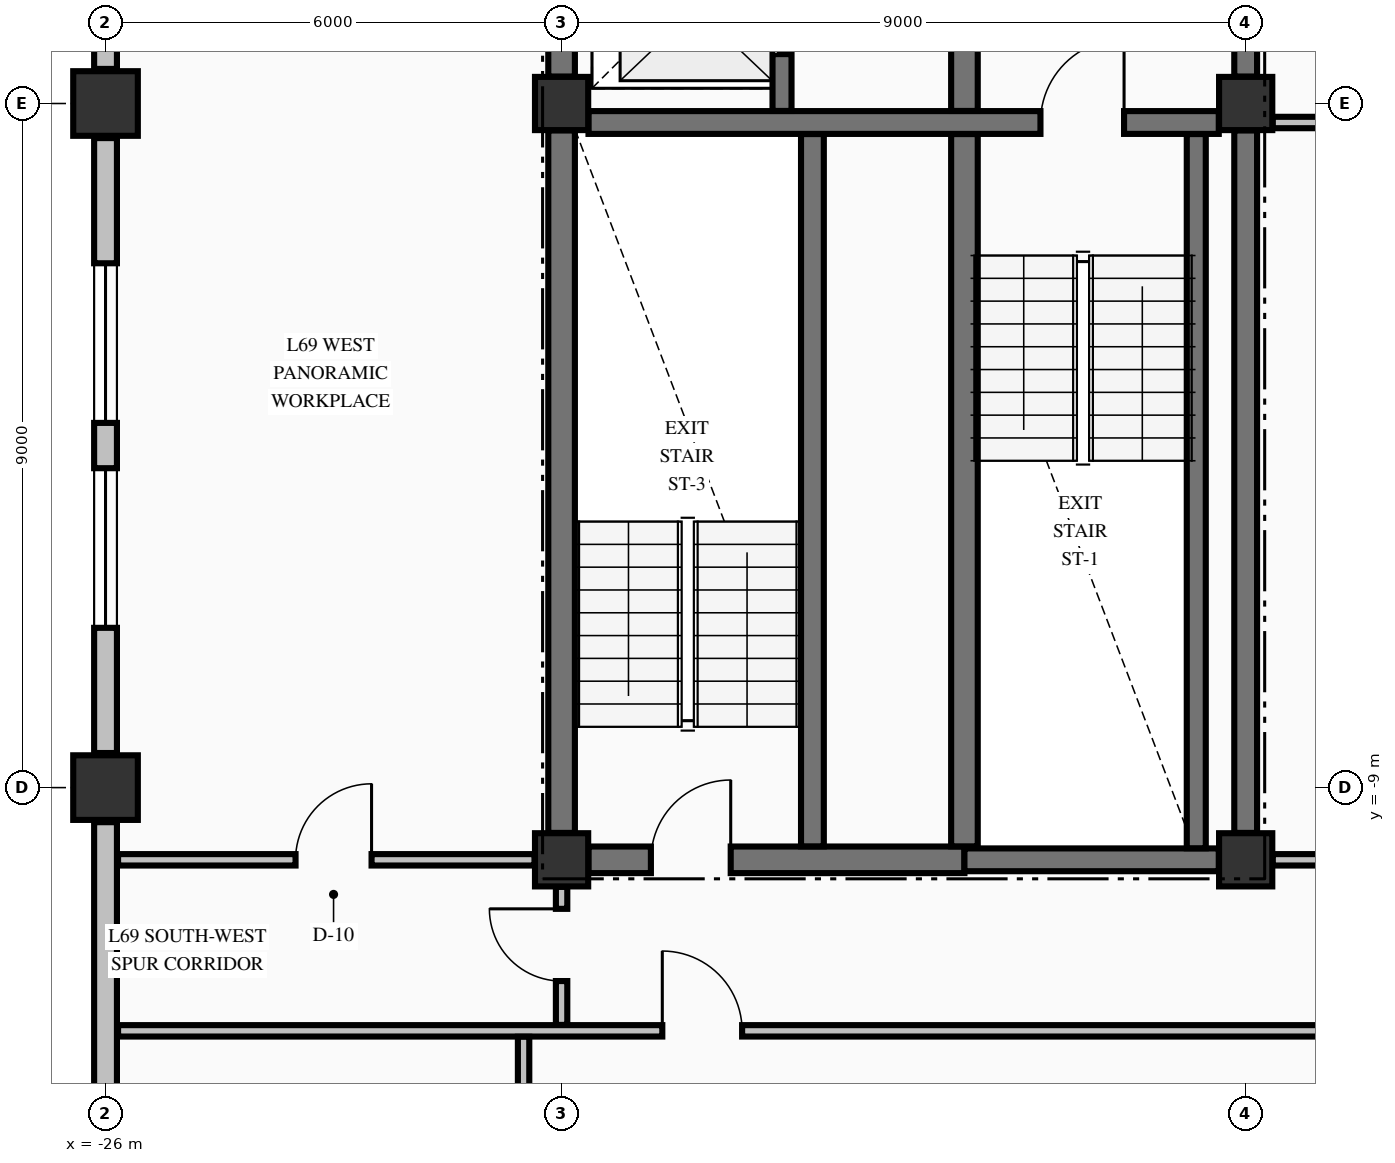
"""IFC4 building model, lengths in metres.
Left out: names, types, materials, properties, quantities, classifications, styles, units other than length and angle.
Written with IfcOpenShell. Run it as: python <this file> out.ifc"""

import sys

from ifc_helpers import new_model, si_unit, direction, frame, frame_2d, origin, origin_2d, place, context, subcontext, project, spatial, rectangle, extrude, element, fill, save


model = new_model("IFC4")
c1 = context("Model", 3, precision=1e-05, world=origin(), true_north=direction((0.0, 1.0)))
c2 = subcontext(c1, "Body", "Model", "MODEL_VIEW")
j1 = project(units=[si_unit("LENGTHUNIT", "METRE"), si_unit("PLANEANGLEUNIT", "RADIAN")], contexts=[c1])
p1 = place(None, origin())
s1 = spatial("IfcSite", under=j1, at=p1, CompositionType="ELEMENT")
p2 = place(p1, origin())
s2 = spatial("IfcBuilding", under=s1, at=p2, CompositionType="ELEMENT")
p3 = place(p2, frame((0.0, 0.0, 260.89)))
s3 = spatial("IfcBuildingStorey", under=s2, at=p3, CompositionType="ELEMENT", Elevation=260.89)
for number, where, z_axis, x_axis in (
    (1, (-26.0, -9.0, -0.25), (0.0, 0.0, 1.0), (1.0, 0.0, 0.0)),
    (2, (-26.0, 0.0, -0.25), (0.0, 0.0, 1.0), (1.0, 0.0, 0.0)),
):
    element("IfcColumn", number, at=place(p3, frame(where, z_axis=z_axis, x_axis=x_axis)), inside=s3, PredefinedType="COLUMN", context=c2, shape_type="SweptSolid", body=[
        extrude(rectangle(XDim=0.85, YDim=0.85, at=origin_2d()), origin(), (0.0, 0.0, 1.0), 3.23),
    ])
for number, where, z_axis, x_axis in (
    (3, (-20.0, -9.95, -0.25), (0.0, 0.0, 1.0), (1.0, 0.0, 0.0)),
    (4, (-11.0, -9.95, -0.25), (0.0, 0.0, 1.0), (1.0, 0.0, 0.0)),
    (5, (-11.0, 0.0, -0.25), (0.0, 0.0, 1.0), (1.0, 0.0, 0.0)),
    (6, (-20.0, 0.0, -0.25), (0.0, 0.0, 1.0), (1.0, 0.0, 0.0)),
):
    element("IfcColumn", number, at=place(p3, frame(where, z_axis=z_axis, x_axis=x_axis)), inside=s3, PredefinedType="COLUMN", context=c2, shape_type="SweptSolid", body=[
        extrude(rectangle(XDim=0.7, YDim=0.7, at=origin_2d()), origin(), (0.0, 0.0, 1.0), 3.23),
    ])
p4 = place(p3, frame((-26.0, -9.455, 0.0), z_axis=(0.0, 0.0, 1.0), x_axis=(0.0, -1.0, 0.0)))
e7 = element("IfcWall", 7, at=p4, inside=s3, PredefinedType="STANDARD", context=c2, shape_type="SweptSolid", body=[
    extrude(rectangle(XDim=8.09, YDim=0.3, at=frame_2d((4.045, 0.0))), origin(), (0.0, 0.0, 1.0), 2.372),
])
p5 = place(p3, frame((-26.0, -0.455, 0.0), z_axis=(0.0, 0.0, 1.0), x_axis=(0.0, -1.0, 0.0)))
e8 = element("IfcWall", 8, at=p5, inside=s3, PredefinedType="STANDARD", context=c2, shape_type="SweptSolid", body=[
    extrude(rectangle(XDim=8.09, YDim=0.3, at=frame_2d((4.045, 0.0))), origin(), (0.0, 0.0, 1.0), 2.372),
])
p6 = place(p5, frame((1.647, 0.0, 0.7)))
e9 = element("IfcOpeningElement", 9, at=p6, cuts=e8, PredefinedType="OPENING", context=c2, shape_type="SweptSolid", body=[
    extrude(rectangle(XDim=2.1, YDim=1.5, at=frame_2d((1.05, 0.75))), frame((0.0, 0.16, 0.0), z_axis=(0.0, -1.0, 0.0), x_axis=(1.0, 0.0, 0.0)), (0.0, 0.0, 1.0), 0.32),
])
p7 = place(p5, frame((4.343, 0.0, 0.7)))
e10 = element("IfcOpeningElement", 10, at=p7, cuts=e8, PredefinedType="OPENING", context=c2, shape_type="SweptSolid", body=[
    extrude(rectangle(XDim=2.1, YDim=1.5, at=frame_2d((1.05, 0.75))), frame((0.0, 0.16, 0.0), z_axis=(0.0, -1.0, 0.0), x_axis=(1.0, 0.0, 0.0)), (0.0, 0.0, 1.0), 0.32),
])
p8 = place(p3, frame((-26.0, 8.545, 0.0), z_axis=(0.0, 0.0, 1.0), x_axis=(0.0, -1.0, 0.0)))
e11 = element("IfcWall", 11, at=p8, inside=s3, PredefinedType="STANDARD", context=c2, shape_type="SweptSolid", body=[
    extrude(rectangle(XDim=8.09, YDim=0.3, at=frame_2d((4.045, 0.0))), origin(), (0.0, 0.0, 1.0), 2.372),
])
p9 = place(p8, frame((1.647, 0.0, 0.7)))
e12 = element("IfcOpeningElement", 12, at=p9, cuts=e11, PredefinedType="OPENING", context=c2, shape_type="SweptSolid", body=[
    extrude(rectangle(XDim=2.1, YDim=1.5, at=frame_2d((1.05, 0.75))), frame((0.0, 0.16, 0.0), z_axis=(0.0, -1.0, 0.0), x_axis=(1.0, 0.0, 0.0)), (0.0, 0.0, 1.0), 0.32),
])
p10 = place(p8, frame((4.343, 0.0, 0.7)))
e13 = element("IfcOpeningElement", 13, at=p10, cuts=e11, PredefinedType="OPENING", context=c2, shape_type="SweptSolid", body=[
    extrude(rectangle(XDim=2.1, YDim=1.5, at=frame_2d((1.05, 0.75))), frame((0.0, 0.16, 0.0), z_axis=(0.0, -1.0, 0.0), x_axis=(1.0, 0.0, 0.0)), (0.0, 0.0, 1.0), 0.32),
])
p11 = place(p3, frame((-19.646, -9.95, 0.0), z_axis=(0.0, 0.0, 1.0), x_axis=(1.0, 0.0, 0.0)))
e14 = element("IfcWall", 14, at=p11, inside=s3, PredefinedType="SHEAR", context=c2, shape_type="SweptSolid", body=[
    extrude(rectangle(XDim=4.946, YDim=0.35, at=frame_2d((2.473, 0.0))), origin(), (0.0, 0.0, 1.0), 2.98),
])
p12 = place(p11, frame((0.821, 0.0, 0.0)))
e15 = element("IfcOpeningElement", 15, at=p12, cuts=e14, PredefinedType="OPENING", context=c2, shape_type="SweptSolid", body=[
    extrude(rectangle(XDim=1.05, YDim=2.15, at=frame_2d((0.525, 1.075))), frame((0.0, 0.185, 0.0), z_axis=(0.0, -1.0, 0.0), x_axis=(1.0, 0.0, 0.0)), (0.0, 0.0, 1.0), 0.37),
])
p13 = place(p3, frame((-14.7, -9.95, 0.0), z_axis=(0.0, 0.0, 1.0), x_axis=(1.0, 0.0, 0.0)))
e16 = element("IfcWall", 16, at=p13, inside=s3, PredefinedType="SHEAR", context=c2, shape_type="SweptSolid", body=[
    extrude(rectangle(XDim=3.346, YDim=0.3, at=frame_2d((1.673, 0.0))), origin(), (0.0, 0.0, 1.0), 2.98),
])
p14 = place(p3, frame((-19.646, -0.25, 0.0), z_axis=(0.0, 0.0, 1.0), x_axis=(1.0, 0.0, 0.0)))
e17 = element("IfcWall", 17, at=p14, inside=s3, PredefinedType="SHEAR", context=c2, shape_type="SweptSolid", body=[
    extrude(rectangle(XDim=8.292, YDim=0.3, at=frame_2d((4.146, 0.0))), origin(), (0.0, 0.0, 1.0), 2.98),
])
p15 = place(p14, frame((5.946, 0.0, 0.0)))
e18 = element("IfcOpeningElement", 18, at=p15, cuts=e17, PredefinedType="OPENING", context=c2, shape_type="SweptSolid", body=[
    extrude(rectangle(XDim=1.1, YDim=2.15, at=frame_2d((0.55, 1.075))), frame((0.0, 0.16, 0.0), z_axis=(0.0, -1.0, 0.0), x_axis=(1.0, 0.0, 0.0)), (0.0, 0.0, 1.0), 0.32),
])
p16 = place(p3, frame((-25.835, -12.2, 0.0), z_axis=(0.0, 0.0, 1.0), x_axis=(1.0, 0.0, 0.0)))
e19 = element("IfcWall", 19, at=p16, inside=s3, PredefinedType="PARTITIONING", context=c2, shape_type="SweptSolid", body=[
    extrude(rectangle(XDim=45.91, YDim=0.15, at=frame_2d((22.955, 0.0))), origin(), (0.0, 0.0, 1.0), 2.98),
])
p17 = place(p16, frame((7.16, 0.0, 0.0)))
e20 = element("IfcOpeningElement", 20, at=p17, cuts=e19, PredefinedType="OPENING", context=c2, shape_type="SweptSolid", body=[
    extrude(rectangle(XDim=1.05, YDim=2.15, at=frame_2d((0.525, 1.075))), frame((0.0, 0.085, 0.0), z_axis=(0.0, -1.0, 0.0), x_axis=(1.0, 0.0, 0.0)), (0.0, 0.0, 1.0), 0.17),
])
p18 = place(p16, frame((33.06, 0.0, 0.0)))
e21 = element("IfcOpeningElement", 21, at=p18, cuts=e19, PredefinedType="OPENING", context=c2, shape_type="SweptSolid", body=[
    extrude(rectangle(XDim=1.05, YDim=2.15, at=frame_2d((0.525, 1.075))), frame((0.0, 0.085, 0.0), z_axis=(0.0, -1.0, 0.0), x_axis=(1.0, 0.0, 0.0)), (0.0, 0.0, 1.0), 0.17),
])
p19 = place(p3, frame((-25.835, -9.95, 0.0), z_axis=(0.0, 0.0, 1.0), x_axis=(1.0, 0.0, 0.0)))
e22 = element("IfcWall", 22, at=p19, inside=s3, PredefinedType="PARTITIONING", context=c2, shape_type="SweptSolid", body=[
    extrude(rectangle(XDim=5.479, YDim=0.15, at=frame_2d((2.74, 0.0))), origin(), (0.0, 0.0, 1.0), 2.98),
])
p20 = place(p19, frame((2.335, 0.0, 0.0)))
e23 = element("IfcOpeningElement", 23, at=p20, cuts=e22, PredefinedType="OPENING", context=c2, shape_type="SweptSolid", body=[
    extrude(rectangle(XDim=1.0, YDim=2.15, at=frame_2d((0.5, 1.075))), frame((0.0, 0.085, 0.0), z_axis=(0.0, -1.0, 0.0), x_axis=(1.0, 0.0, 0.0)), (0.0, 0.0, 1.0), 0.17),
])
p21 = place(p3, frame((-10.644, -9.95, 0.0), z_axis=(0.0, 0.0, 1.0), x_axis=(1.0, 0.0, 0.0)))
e24 = element("IfcWall", 24, at=p21, inside=s3, PredefinedType="PARTITIONING", context=c2, shape_type="SweptSolid", body=[
    extrude(rectangle(XDim=21.288, YDim=0.15, at=frame_2d((10.644, 0.0))), origin(), (0.0, 0.0, 1.0), 2.98),
])
p22 = place(p21, frame((14.294, 0.0, 0.0)))
e25 = element("IfcOpeningElement", 25, at=p22, cuts=e24, PredefinedType="OPENING", context=c2, shape_type="SweptSolid", body=[
    extrude(rectangle(XDim=1.1, YDim=2.15, at=frame_2d((0.55, 1.075))), frame((0.0, 0.085, 0.0), z_axis=(0.0, -1.0, 0.0), x_axis=(1.0, 0.0, 0.0)), (0.0, 0.0, 1.0), 0.17),
])
p23 = place(p21, frame((19.719, 0.0, 0.0)))
e26 = element("IfcOpeningElement", 26, at=p23, cuts=e24, PredefinedType="OPENING", context=c2, shape_type="SweptSolid", body=[
    extrude(rectangle(XDim=0.95, YDim=2.15, at=frame_2d((0.475, 1.075))), frame((0.0, 0.085, 0.0), z_axis=(0.0, -1.0, 0.0), x_axis=(1.0, 0.0, 0.0)), (0.0, 0.0, 1.0), 0.17),
])
p24 = place(p3, frame((-10.644, -0.25, 0.0), z_axis=(0.0, 0.0, 1.0), x_axis=(1.0, 0.0, 0.0)))
e27 = element("IfcWall", 27, at=p24, inside=s3, PredefinedType="PARTITIONING", context=c2, shape_type="SweptSolid", body=[
    extrude(rectangle(XDim=21.288, YDim=0.15, at=frame_2d((10.644, 0.0))), origin(), (0.0, 0.0, 1.0), 2.98),
])
p25 = place(p24, frame((14.294, 0.0, 0.0)))
e28 = element("IfcOpeningElement", 28, at=p25, cuts=e27, PredefinedType="OPENING", context=c2, shape_type="SweptSolid", body=[
    extrude(rectangle(XDim=1.1, YDim=2.15, at=frame_2d((0.55, 1.075))), frame((0.0, 0.085, 0.0), z_axis=(0.0, -1.0, 0.0), x_axis=(1.0, 0.0, 0.0)), (0.0, 0.0, 1.0), 0.17),
])
p26 = place(p24, frame((6.169, 0.0, 0.0)))
e29 = element("IfcOpeningElement", 29, at=p26, cuts=e27, PredefinedType="OPENING", context=c2, shape_type="SweptSolid", body=[
    extrude(rectangle(XDim=1.05, YDim=2.15, at=frame_2d((0.525, 1.075))), frame((0.0, 0.085, 0.0), z_axis=(0.0, -1.0, 0.0), x_axis=(1.0, 0.0, 0.0)), (0.0, 0.0, 1.0), 0.17),
])
p27 = place(p24, frame((18.319, 0.0, 0.0)))
e30 = element("IfcOpeningElement", 30, at=p27, cuts=e27, PredefinedType="OPENING", context=c2, shape_type="SweptSolid", body=[
    extrude(rectangle(XDim=0.95, YDim=2.15, at=frame_2d((0.475, 1.075))), frame((0.0, 0.085, 0.0), z_axis=(0.0, -1.0, 0.0), x_axis=(1.0, 0.0, 0.0)), (0.0, 0.0, 1.0), 0.17),
])
p28 = place(p3, frame((-20.0, -9.596, 0.0), z_axis=(0.0, 0.0, 1.0), x_axis=(0.0, 1.0, 0.0)))
e31 = element("IfcWall", 31, at=p28, inside=s3, PredefinedType="SHEAR", context=c2, shape_type="SweptSolid", body=[
    extrude(rectangle(XDim=9.242, YDim=0.35, at=frame_2d((4.621, 0.0))), origin(), (0.0, 0.0, 1.0), 2.98),
])
p29 = place(p3, frame((-20.0, 0.354, 0.0), z_axis=(0.0, 0.0, 1.0), x_axis=(0.0, 1.0, 0.0)))
e32 = element("IfcWall", 32, at=p29, inside=s3, PredefinedType="SHEAR", context=c2, shape_type="SweptSolid", body=[
    extrude(rectangle(XDim=2.169, YDim=0.35, at=frame_2d((1.084, 0.0))), origin(), (0.0, 0.0, 1.0), 2.98),
])
p30 = place(p3, frame((-17.1, -0.098, 0.0), z_axis=(0.0, 0.0, 1.0), x_axis=(0.0, 1.0, 0.0)))
e33 = element("IfcWall", 33, at=p30, inside=s3, PredefinedType="SOLIDWALL", context=c2, shape_type="SweptSolid", body=[
    extrude(rectangle(XDim=2.621, YDim=0.25, at=frame_2d((1.311, 0.0))), origin(), (0.0, 0.0, 1.0), 2.98),
])
p31 = place(p30, frame((0.748, 0.0, 0.0)))
e34 = element("IfcOpeningElement", 34, at=p31, cuts=e33, PredefinedType="OPENING", context=c2, shape_type="SweptSolid", body=[
    extrude(rectangle(XDim=1.1, YDim=2.2, at=frame_2d((0.55, 1.1))), frame((0.0, 0.135, 0.0), z_axis=(0.0, -1.0, 0.0), x_axis=(1.0, 0.0, 0.0)), (0.0, 0.0, 1.0), 0.27),
])
p32 = place(p3, frame((-16.7, -9.773, 0.0), z_axis=(0.0, 0.0, 1.0), x_axis=(0.0, 1.0, 0.0)))
e35 = element("IfcWall", 35, at=p32, inside=s3, PredefinedType="SHEAR", context=c2, shape_type="SweptSolid", body=[
    extrude(rectangle(XDim=9.371, YDim=0.3, at=frame_2d((4.686, 0.0))), origin(), (0.0, 0.0, 1.0), 2.98),
])
p33 = place(p3, frame((-14.7, -9.773, 0.0), z_axis=(0.0, 0.0, 1.0), x_axis=(0.0, 1.0, 0.0)))
e36 = element("IfcWall", 36, at=p33, inside=s3, PredefinedType="SHEAR", context=c2, shape_type="SweptSolid", body=[
    extrude(rectangle(XDim=9.371, YDim=0.35, at=frame_2d((4.686, 0.0))), origin(), (0.0, 0.0, 1.0), 2.98),
])
p34 = place(p3, frame((-14.7, -0.098, 0.0), z_axis=(0.0, 0.0, 1.0), x_axis=(0.0, 1.0, 0.0)))
e37 = element("IfcWall", 37, at=p34, inside=s3, PredefinedType="SHEAR", context=c2, shape_type="SweptSolid", body=[
    extrude(rectangle(XDim=2.846, YDim=0.35, at=frame_2d((1.423, 0.0))), origin(), (0.0, 0.0, 1.0), 2.98),
])
p35 = place(p3, frame((-11.65, -9.798, 0.0), z_axis=(0.0, 0.0, 1.0), x_axis=(0.0, 1.0, 0.0)))
e38 = element("IfcWall", 38, at=p35, inside=s3, PredefinedType="SOLIDWALL", context=c2, shape_type="SweptSolid", body=[
    extrude(rectangle(XDim=9.396, YDim=0.25, at=frame_2d((4.698, 0.0))), origin(), (0.0, 0.0, 1.0), 2.98),
])
p36 = place(p3, frame((-11.0, -9.596, 0.0), z_axis=(0.0, 0.0, 1.0), x_axis=(0.0, 1.0, 0.0)))
e39 = element("IfcWall", 39, at=p36, inside=s3, PredefinedType="SHEAR", context=c2, shape_type="SweptSolid", body=[
    extrude(rectangle(XDim=9.242, YDim=0.3, at=frame_2d((4.621, 0.0))), origin(), (0.0, 0.0, 1.0), 2.98),
])
p37 = place(p3, frame((-11.0, 0.354, 0.0), z_axis=(0.0, 0.0, 1.0), x_axis=(0.0, 1.0, 0.0)))
e40 = element("IfcWall", 40, at=p37, inside=s3, PredefinedType="SHEAR", context=c2, shape_type="SweptSolid", body=[
    extrude(rectangle(XDim=2.394, YDim=0.3, at=frame_2d((1.197, 0.0))), origin(), (0.0, 0.0, 1.0), 2.98),
])
p38 = place(p37, frame((0.746, 0.0, 0.0)))
e41 = element("IfcOpeningElement", 41, at=p38, cuts=e40, PredefinedType="OPENING", context=c2, shape_type="SweptSolid", body=[
    extrude(rectangle(XDim=1.1, YDim=2.15, at=frame_2d((0.55, 1.075))), frame((0.0, 0.16, 0.0), z_axis=(0.0, -1.0, 0.0), x_axis=(1.0, 0.0, 0.0)), (0.0, 0.0, 1.0), 0.32),
])
p39 = place(p3, frame((-20.5, -17.569, 0.0), z_axis=(0.0, 0.0, 1.0), x_axis=(0.0, 1.0, 0.0)))
e42 = element("IfcWall", 42, at=p39, inside=s3, PredefinedType="PARTITIONING", context=c2, shape_type="SweptSolid", body=[
    extrude(rectangle(XDim=5.291, YDim=0.15, at=frame_2d((2.646, 0.0))), origin(), (0.0, 0.0, 1.0), 2.98),
])
p40 = place(p3, frame((-20.0, -12.122, 0.0), z_axis=(0.0, 0.0, 1.0), x_axis=(0.0, 1.0, 0.0)))
e43 = element("IfcWall", 43, at=p40, inside=s3, PredefinedType="PARTITIONING", context=c2, shape_type="SweptSolid", body=[
    extrude(rectangle(XDim=1.816, YDim=0.15, at=frame_2d((0.908, 0.0))), origin(), (0.0, 0.0, 1.0), 2.98),
])
p41 = place(p40, frame((0.577, 0.0, 0.0)))
e44 = element("IfcOpeningElement", 44, at=p41, cuts=e43, PredefinedType="OPENING", context=c2, shape_type="SweptSolid", body=[
    extrude(rectangle(XDim=0.95, YDim=2.15, at=frame_2d((0.475, 1.075))), frame((0.0, 0.085, 0.0), z_axis=(0.0, -1.0, 0.0), x_axis=(1.0, 0.0, 0.0)), (0.0, 0.0, 1.0), 0.17),
])
p42 = place(p6, origin())
e45 = element("IfcWindow", 45, at=p42, inside=s3, PartitioningType="SINGLE_PANEL", PredefinedType="WINDOW", context=c2, shape_type="SweptSolid", body=[
    extrude(rectangle(XDim=2.1, YDim=1.5, at=frame_2d((1.05, 0.75))), frame((0.0, 0.03, 0.0), z_axis=(0.0, -1.0, 0.0), x_axis=(1.0, 0.0, 0.0)), (0.0, 0.0, 1.0), 0.06),
])
fill(e9, e45)
p43 = place(p7, origin())
e46 = element("IfcWindow", 46, at=p43, inside=s3, PartitioningType="SINGLE_PANEL", PredefinedType="WINDOW", context=c2, shape_type="SweptSolid", body=[
    extrude(rectangle(XDim=2.1, YDim=1.5, at=frame_2d((1.05, 0.75))), frame((0.0, 0.03, 0.0), z_axis=(0.0, -1.0, 0.0), x_axis=(1.0, 0.0, 0.0)), (0.0, 0.0, 1.0), 0.06),
])
fill(e10, e46)
p44 = place(p15, origin())
e47 = element("IfcDoor", 47, at=p44, inside=s3, OperationType="SINGLE_SWING_RIGHT", PredefinedType="DOOR", context=c2, shape_type="SweptSolid", body=[
    extrude(rectangle(XDim=1.1, YDim=2.15, at=frame_2d((0.55, 1.075))), frame((0.0, 0.025, 0.0), z_axis=(0.0, -1.0, 0.0), x_axis=(1.0, 0.0, 0.0)), (0.0, 0.0, 1.0), 0.05),
])
fill(e18, e47)
p45 = place(p12, origin())
e48 = element("IfcDoor", 48, at=p45, inside=s3, OperationType="SINGLE_SWING_RIGHT", PredefinedType="DOOR", context=c2, shape_type="SweptSolid", body=[
    extrude(rectangle(XDim=1.05, YDim=2.15, at=frame_2d((0.525, 1.075))), frame((0.0, 0.025, 0.0), z_axis=(0.0, -1.0, 0.0), x_axis=(1.0, 0.0, 0.0)), (0.0, 0.0, 1.0), 0.05),
])
fill(e15, e48)
p46 = place(p31, origin())
e49 = element("IfcDoor", 49, at=p46, inside=s3, OperationType="SLIDING_TO_LEFT", PredefinedType="DOOR", context=c2, shape_type="SweptSolid", body=[
    extrude(rectangle(XDim=1.1, YDim=2.2, at=frame_2d((0.55, 1.1))), frame((0.0, 0.025, 0.0), z_axis=(0.0, -1.0, 0.0), x_axis=(1.0, 0.0, 0.0)), (0.0, 0.0, 1.0), 0.05),
])
fill(e34, e49)
p47 = place(p17, origin())
e50 = element("IfcDoor", 50, at=p47, inside=s3, OperationType="SINGLE_SWING_LEFT", PredefinedType="DOOR", context=c2, shape_type="SweptSolid", body=[
    extrude(rectangle(XDim=1.05, YDim=2.15, at=frame_2d((0.525, 1.075))), frame((0.0, 0.025, 0.0), z_axis=(0.0, -1.0, 0.0), x_axis=(1.0, 0.0, 0.0)), (0.0, 0.0, 1.0), 0.05),
])
fill(e20, e50)
p48 = place(p41, origin())
e51 = element("IfcDoor", 51, at=p48, inside=s3, OperationType="SINGLE_SWING_RIGHT", PredefinedType="DOOR", context=c2, shape_type="SweptSolid", body=[
    extrude(rectangle(XDim=0.95, YDim=2.15, at=frame_2d((0.475, 1.075))), frame((0.0, 0.025, 0.0), z_axis=(0.0, -1.0, 0.0), x_axis=(1.0, 0.0, 0.0)), (0.0, 0.0, 1.0), 0.05),
])
fill(e44, e51)
p49 = place(p20, origin())
e52 = element("IfcDoor", 52, at=p49, inside=s3, OperationType="SINGLE_SWING_RIGHT", PredefinedType="DOOR", context=c2, shape_type="SweptSolid", body=[
    extrude(rectangle(XDim=1.0, YDim=2.15, at=frame_2d((0.5, 1.075))), frame((0.0, 0.025, 0.0), z_axis=(0.0, -1.0, 0.0), x_axis=(1.0, 0.0, 0.0)), (0.0, 0.0, 1.0), 0.05),
])
fill(e23, e52)
save(model, sys.argv[1])
